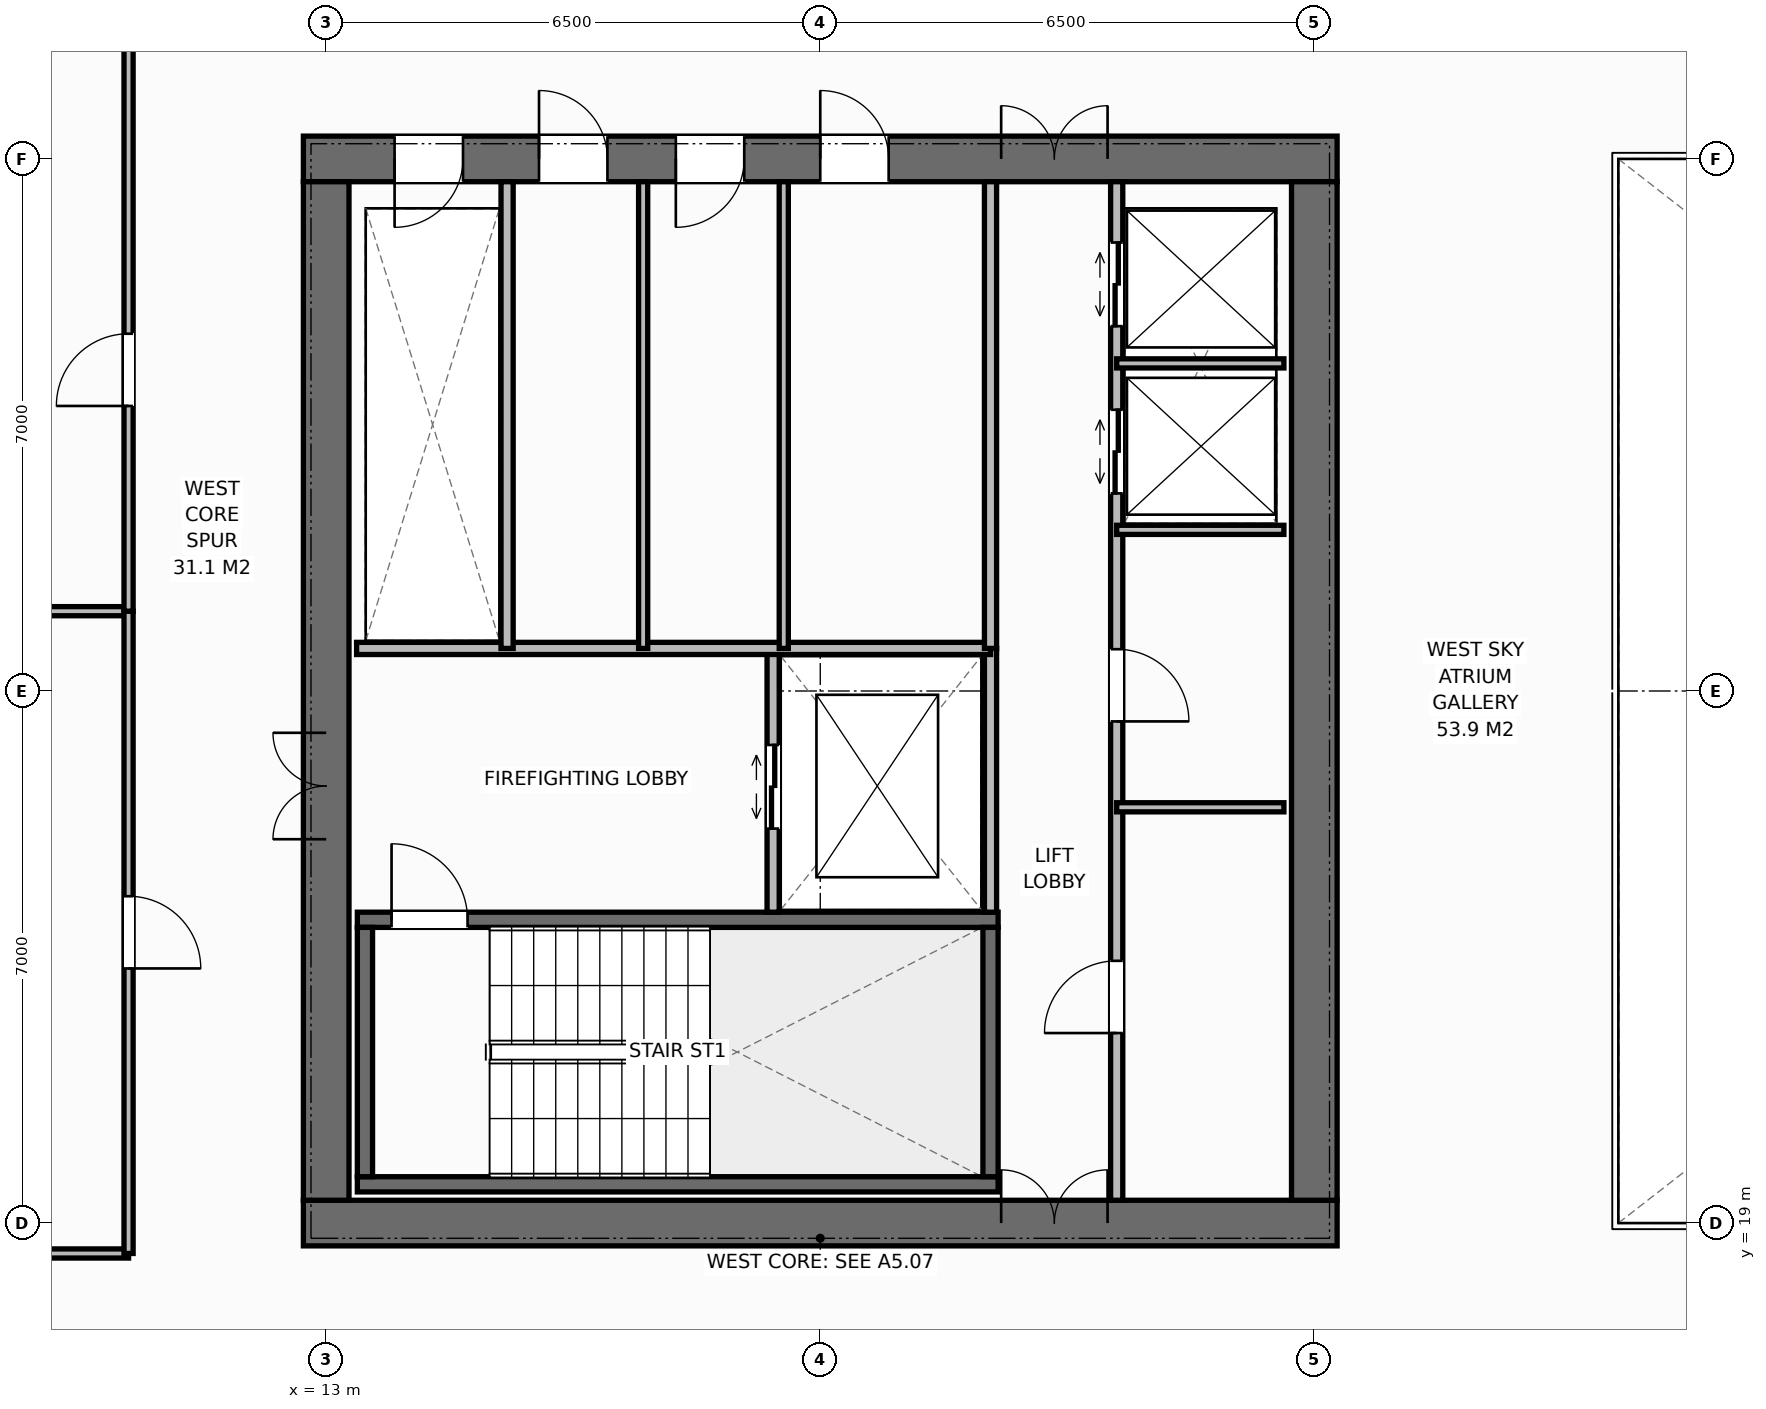
"""IFC4 building model, lengths in metres.
Left out: names, types, materials, properties, quantities, classifications, styles, units other than length and angle.
Written with IfcOpenShell. Run it as: python <this file> out.ifc"""

import sys

from ifc_helpers import new_model, si_unit, direction, frame, frame_2d, origin, place, context, subcontext, project, spatial, rectangle, extrude, element, fill, save


model = new_model("IFC4")
c1 = context("Model", 3, precision=1e-05, world=origin(), true_north=direction((0.0, 1.0)))
c2 = subcontext(c1, "Body", "Model", "MODEL_VIEW")
j1 = project(units=[si_unit("LENGTHUNIT", "METRE"), si_unit("PLANEANGLEUNIT", "RADIAN")], contexts=[c1])
p1 = place(None, origin())
s1 = spatial("IfcSite", under=j1, at=p1, CompositionType="ELEMENT")
p2 = place(p1, origin())
s2 = spatial("IfcBuilding", under=s1, at=p2, CompositionType="ELEMENT")
p3 = place(p2, frame((0.0, 0.0, 174.6)))
s3 = spatial("IfcBuildingStorey", under=s2, at=p3, CompositionType="ELEMENT", Elevation=174.6)
p4 = place(p3, frame((12.7, 19.0, 0.0), z_axis=(0.0, 0.0, 1.0), x_axis=(1.0, 0.0, 0.0)))
e1 = element("IfcWall", 1, at=p4, inside=s3, PredefinedType="SHEAR", context=c2, shape_type="SweptSolid", body=[
    extrude(rectangle(XDim=13.6, YDim=0.6, at=frame_2d((6.8, 0.0))), origin(), (0.0, 0.0, 1.0), 3.8),
])
p5 = place(p4, frame((9.18, 0.0, 0.0)))
e2 = element("IfcOpeningElement", 2, at=p5, cuts=e1, PredefinedType="OPENING", context=c2, shape_type="SweptSolid", body=[
    extrude(rectangle(XDim=1.4, YDim=2.2, at=frame_2d((0.7, 1.1))), frame((0.0, 0.31, 0.0), z_axis=(0.0, -1.0, 0.0), x_axis=(1.0, 0.0, 0.0)), (0.0, 0.0, 1.0), 0.62),
])
p6 = place(p3, frame((12.7, 33.0, 0.0), z_axis=(0.0, 0.0, 1.0), x_axis=(1.0, 0.0, 0.0)))
e3 = element("IfcWall", 3, at=p6, inside=s3, PredefinedType="SHEAR", context=c2, shape_type="SweptSolid", body=[
    extrude(rectangle(XDim=13.6, YDim=0.6, at=frame_2d((6.8, 0.0))), origin(), (0.0, 0.0, 1.0), 3.8),
])
p7 = place(p6, frame((1.2, 0.0, 0.0)))
e4 = element("IfcOpeningElement", 4, at=p7, cuts=e3, PredefinedType="OPENING", context=c2, shape_type="SweptSolid", body=[
    extrude(rectangle(XDim=0.9, YDim=2.15, at=frame_2d((0.45, 1.075))), frame((0.0, 0.31, 0.0), z_axis=(0.0, -1.0, 0.0), x_axis=(1.0, 0.0, 0.0)), (0.0, 0.0, 1.0), 0.62),
])
p8 = place(p6, frame((3.1, 0.0, 0.0)))
e5 = element("IfcOpeningElement", 5, at=p8, cuts=e3, PredefinedType="OPENING", context=c2, shape_type="SweptSolid", body=[
    extrude(rectangle(XDim=0.9, YDim=2.15, at=frame_2d((0.45, 1.075))), frame((0.0, 0.31, 0.0), z_axis=(0.0, -1.0, 0.0), x_axis=(1.0, 0.0, 0.0)), (0.0, 0.0, 1.0), 0.62),
])
p9 = place(p6, frame((4.9, 0.0, 0.0)))
e6 = element("IfcOpeningElement", 6, at=p9, cuts=e3, PredefinedType="OPENING", context=c2, shape_type="SweptSolid", body=[
    extrude(rectangle(XDim=0.9, YDim=2.15, at=frame_2d((0.45, 1.075))), frame((0.0, 0.31, 0.0), z_axis=(0.0, -1.0, 0.0), x_axis=(1.0, 0.0, 0.0)), (0.0, 0.0, 1.0), 0.62),
])
p10 = place(p6, frame((6.8, 0.0, 0.0)))
e7 = element("IfcOpeningElement", 7, at=p10, cuts=e3, PredefinedType="OPENING", context=c2, shape_type="SweptSolid", body=[
    extrude(rectangle(XDim=0.9, YDim=2.15, at=frame_2d((0.45, 1.075))), frame((0.0, 0.31, 0.0), z_axis=(0.0, -1.0, 0.0), x_axis=(1.0, 0.0, 0.0)), (0.0, 0.0, 1.0), 0.62),
])
p11 = place(p6, frame((9.18, 0.0, 0.0)))
e8 = element("IfcOpeningElement", 8, at=p11, cuts=e3, PredefinedType="OPENING", context=c2, shape_type="SweptSolid", body=[
    extrude(rectangle(XDim=1.4, YDim=2.2, at=frame_2d((0.7, 1.1))), frame((0.0, 0.31, 0.0), z_axis=(0.0, -1.0, 0.0), x_axis=(1.0, 0.0, 0.0)), (0.0, 0.0, 1.0), 0.62),
])
p12 = place(p3, frame((13.0, 19.3, 0.0), z_axis=(0.0, 0.0, 1.0), x_axis=(0.0, 1.0, 0.0)))
e9 = element("IfcWall", 9, at=p12, inside=s3, PredefinedType="SHEAR", context=c2, shape_type="SweptSolid", body=[
    extrude(rectangle(XDim=13.4, YDim=0.6, at=frame_2d((6.7, 0.0))), origin(), (0.0, 0.0, 1.0), 3.8),
])
p13 = place(p12, frame((4.75, 0.0, 0.0)))
e10 = element("IfcOpeningElement", 10, at=p13, cuts=e9, PredefinedType="OPENING", context=c2, shape_type="SweptSolid", body=[
    extrude(rectangle(XDim=1.4, YDim=2.2, at=frame_2d((0.7, 1.1))), frame((0.0, 0.31, 0.0), z_axis=(0.0, -1.0, 0.0), x_axis=(1.0, 0.0, 0.0)), (0.0, 0.0, 1.0), 0.62),
])
p14 = place(p3, frame((26.0, 19.3, 0.0), z_axis=(0.0, 0.0, 1.0), x_axis=(0.0, 1.0, 0.0)))
e11 = element("IfcWall", 11, at=p14, inside=s3, PredefinedType="SHEAR", context=c2, shape_type="SweptSolid", body=[
    extrude(rectangle(XDim=13.4, YDim=0.6, at=frame_2d((6.7, 0.0))), origin(), (0.0, 0.0, 1.0), 3.8),
])
p15 = place(p3, frame((13.41, 19.51, 0.0), z_axis=(0.0, 0.0, 1.0), x_axis=(1.0, 0.0, 0.0)))
e12 = element("IfcWall", 12, at=p15, inside=s3, PredefinedType="SHEAR", context=c2, shape_type="SweptSolid", body=[
    extrude(rectangle(XDim=8.43, YDim=0.2, at=frame_2d((4.215, 0.0))), origin(), (0.0, 0.0, 1.0), 3.8),
])
p16 = place(p3, frame((13.41, 22.99, 0.0), z_axis=(0.0, 0.0, 1.0), x_axis=(1.0, 0.0, 0.0)))
e13 = element("IfcWall", 13, at=p16, inside=s3, PredefinedType="SHEAR", context=c2, shape_type="SweptSolid", body=[
    extrude(rectangle(XDim=8.43, YDim=0.2, at=frame_2d((4.215, 0.0))), origin(), (0.0, 0.0, 1.0), 3.8),
])
p17 = place(p16, frame((0.45, 0.0, 0.0)))
e14 = element("IfcOpeningElement", 14, at=p17, cuts=e13, PredefinedType="OPENING", context=c2, shape_type="SweptSolid", body=[
    extrude(rectangle(XDim=1.0, YDim=2.15, at=frame_2d((0.5, 1.075))), frame((0.0, 0.11, 0.0), z_axis=(0.0, -1.0, 0.0), x_axis=(1.0, 0.0, 0.0)), (0.0, 0.0, 1.0), 0.22),
])
for number, where, z_axis, x_axis in (
    (15, (13.51, 19.61, 0.0), (0.0, 0.0, 1.0), (0.0, 1.0, 0.0)),
    (16, (21.74, 19.61, 0.0), (0.0, 0.0, 1.0), (0.0, 1.0, 0.0)),
):
    element("IfcWall", number, at=place(p3, frame(where, z_axis=z_axis, x_axis=x_axis)), inside=s3, PredefinedType="SHEAR", context=c2, shape_type="SweptSolid", body=[
        extrude(rectangle(XDim=3.28, YDim=0.2, at=frame_2d((1.64, 0.0))), origin(), (0.0, 0.0, 1.0), 3.8),
    ])
p18 = place(p3, frame((21.74, 23.09, 0.0), z_axis=(0.0, 0.0, 1.0), x_axis=(0.0, 1.0, 0.0)))
e17 = element("IfcWall", 17, at=p18, inside=s3, PredefinedType="STANDARD", context=c2, shape_type="SweptSolid", body=[
    extrude(rectangle(XDim=3.47, YDim=0.16, at=frame_2d((1.735, 0.0))), origin(), (0.0, 0.0, 1.0), 3.572),
])
p19 = place(p3, frame((18.88, 23.09, 0.0), z_axis=(0.0, 0.0, 1.0), x_axis=(0.0, 1.0, 0.0)))
e18 = element("IfcWall", 18, at=p19, inside=s3, PredefinedType="STANDARD", context=c2, shape_type="SweptSolid", body=[
    extrude(rectangle(XDim=3.47, YDim=0.16, at=frame_2d((1.735, 0.0))), origin(), (0.0, 0.0, 1.0), 3.572),
])
p20 = place(p19, frame((1.1, 0.0, 0.0)))
e19 = element("IfcOpeningElement", 19, at=p20, cuts=e18, PredefinedType="OPENING", context=c2, shape_type="SweptSolid", body=[
    extrude(rectangle(XDim=1.1, YDim=2.2, at=frame_2d((0.55, 1.1))), frame((0.0, 0.09, 0.0), z_axis=(0.0, -1.0, 0.0), x_axis=(1.0, 0.0, 0.0)), (0.0, 0.0, 1.0), 0.18),
])
p21 = place(p3, frame((13.4, 26.56, 0.0), z_axis=(0.0, 0.0, 1.0), x_axis=(1.0, 0.0, 0.0)))
e20 = element("IfcWall", 20, at=p21, inside=s3, PredefinedType="STANDARD", context=c2, shape_type="SweptSolid", body=[
    extrude(rectangle(XDim=8.34, YDim=0.16, at=frame_2d((4.17, 0.0))), origin(), (0.0, 0.0, 1.0), 3.572),
])
p22 = place(p3, frame((15.38, 26.56, 0.0), z_axis=(0.0, 0.0, 1.0), x_axis=(0.0, 1.0, 0.0)))
e21 = element("IfcWall", 21, at=p22, inside=s3, PredefinedType="STANDARD", context=c2, shape_type="SweptSolid", body=[
    extrude(rectangle(XDim=6.14, YDim=0.16, at=frame_2d((3.07, 0.0))), origin(), (0.0, 0.0, 1.0), 3.572),
])
for number, where, z_axis, x_axis in (
    (22, (17.17, 26.56, 0.0), (0.0, 0.0, 1.0), (0.0, 1.0, 0.0)),
    (23, (19.02, 26.56, 0.0), (0.0, 0.0, 1.0), (0.0, 1.0, 0.0)),
):
    element("IfcWall", number, at=place(p3, frame(where, z_axis=z_axis, x_axis=x_axis)), inside=s3, PredefinedType="PARTITIONING", context=c2, shape_type="SweptSolid", body=[
        extrude(rectangle(XDim=6.14, YDim=0.12, at=frame_2d((3.07, 0.0))), origin(), (0.0, 0.0, 1.0), 3.572),
    ])
p23 = place(p3, frame((21.74, 26.56, 0.0), z_axis=(0.0, 0.0, 1.0), x_axis=(0.0, 1.0, 0.0)))
e24 = element("IfcWall", 24, at=p23, inside=s3, PredefinedType="STANDARD", context=c2, shape_type="SweptSolid", body=[
    extrude(rectangle(XDim=6.14, YDim=0.16, at=frame_2d((3.07, 0.0))), origin(), (0.0, 0.0, 1.0), 3.572),
])
p24 = place(p3, frame((23.4, 19.3, 0.0), z_axis=(0.0, 0.0, 1.0), x_axis=(0.0, 1.0, 0.0)))
e25 = element("IfcWall", 25, at=p24, inside=s3, PredefinedType="STANDARD", context=c2, shape_type="SweptSolid", body=[
    extrude(rectangle(XDim=13.4, YDim=0.16, at=frame_2d((6.7, 0.0))), origin(), (0.0, 0.0, 1.0), 3.572),
])
p25 = place(p24, frame((2.2, 0.0, 0.0)))
e26 = element("IfcOpeningElement", 26, at=p25, cuts=e25, PredefinedType="OPENING", context=c2, shape_type="SweptSolid", body=[
    extrude(rectangle(XDim=0.95, YDim=2.15, at=frame_2d((0.475, 1.075))), frame((0.0, 0.09, 0.0), z_axis=(0.0, -1.0, 0.0), x_axis=(1.0, 0.0, 0.0)), (0.0, 0.0, 1.0), 0.18),
])
p26 = place(p24, frame((6.3, 0.0, 0.0)))
e27 = element("IfcOpeningElement", 27, at=p26, cuts=e25, PredefinedType="OPENING", context=c2, shape_type="SweptSolid", body=[
    extrude(rectangle(XDim=0.95, YDim=2.15, at=frame_2d((0.475, 1.075))), frame((0.0, 0.09, 0.0), z_axis=(0.0, -1.0, 0.0), x_axis=(1.0, 0.0, 0.0)), (0.0, 0.0, 1.0), 0.18),
])
p27 = place(p24, frame((9.3, 0.0, 0.0)))
e28 = element("IfcOpeningElement", 28, at=p27, cuts=e25, PredefinedType="OPENING", context=c2, shape_type="SweptSolid", body=[
    extrude(rectangle(XDim=1.1, YDim=2.2, at=frame_2d((0.55, 1.1))), frame((0.0, 0.09, 0.0), z_axis=(0.0, -1.0, 0.0), x_axis=(1.0, 0.0, 0.0)), (0.0, 0.0, 1.0), 0.18),
])
p28 = place(p24, frame((11.5, 0.0, 0.0)))
e29 = element("IfcOpeningElement", 29, at=p28, cuts=e25, PredefinedType="OPENING", context=c2, shape_type="SweptSolid", body=[
    extrude(rectangle(XDim=1.1, YDim=2.2, at=frame_2d((0.55, 1.1))), frame((0.0, 0.09, 0.0), z_axis=(0.0, -1.0, 0.0), x_axis=(1.0, 0.0, 0.0)), (0.0, 0.0, 1.0), 0.18),
])
for number, where, z_axis, x_axis in (
    (30, (23.4, 24.47, 0.0), (0.0, 0.0, 1.0), (1.0, 0.0, 0.0)),
    (31, (23.4, 28.12, 0.0), (0.0, 0.0, 1.0), (1.0, 0.0, 0.0)),
    (32, (23.4, 30.31, 0.0), (0.0, 0.0, 1.0), (1.0, 0.0, 0.0)),
):
    element("IfcWall", number, at=place(p3, frame(where, z_axis=z_axis, x_axis=x_axis)), inside=s3, PredefinedType="PARTITIONING", context=c2, shape_type="SweptSolid", body=[
        extrude(rectangle(XDim=2.2, YDim=0.12, at=frame_2d((1.1, 0.0))), origin(), (0.0, 0.0, 1.0), 3.572),
    ])
for number, where, z_axis, x_axis in (
    (33, (3.82, 18.6, 0.0), (0.0, 0.0, 1.0), (1.0, 0.0, 0.0)),
    (34, (3.82, 27.05, 0.0), (0.0, 0.0, 1.0), (1.0, 0.0, 0.0)),
):
    element("IfcWall", number, at=place(p3, frame(where, z_axis=z_axis, x_axis=x_axis)), inside=s3, PredefinedType="PARTITIONING", context=c2, shape_type="SweptSolid", body=[
        extrude(rectangle(XDim=6.58, YDim=0.12, at=frame_2d((3.29, 0.0))), origin(), (0.0, 0.0, 1.0), 3.572),
    ])
p29 = place(p3, frame((10.4, 18.6, 0.0), z_axis=(0.0, 0.0, 1.0), x_axis=(0.0, 1.0, 0.0)))
e35 = element("IfcWall", 35, at=p29, inside=s3, PredefinedType="PARTITIONING", context=c2, shape_type="SweptSolid", body=[
    extrude(rectangle(XDim=8.45, YDim=0.12, at=frame_2d((4.225, 0.0))), origin(), (0.0, 0.0, 1.0), 3.572),
])
p30 = place(p29, frame((3.75, 0.0, 0.0)))
e36 = element("IfcOpeningElement", 36, at=p30, cuts=e35, PredefinedType="OPENING", context=c2, shape_type="SweptSolid", body=[
    extrude(rectangle(XDim=0.95, YDim=2.15, at=frame_2d((0.475, 1.075))), frame((0.0, 0.07, 0.0), z_axis=(0.0, -1.0, 0.0), x_axis=(1.0, 0.0, 0.0)), (0.0, 0.0, 1.0), 0.14),
])
p31 = place(p3, frame((10.4, 27.05, 0.0), z_axis=(0.0, 0.0, 1.0), x_axis=(0.0, 1.0, 0.0)))
e37 = element("IfcWall", 37, at=p31, inside=s3, PredefinedType="PARTITIONING", context=c2, shape_type="SweptSolid", body=[
    extrude(rectangle(XDim=8.45, YDim=0.12, at=frame_2d((4.225, 0.0))), origin(), (0.0, 0.0, 1.0), 3.572),
])
p32 = place(p31, frame((2.7, 0.0, 0.0)))
e38 = element("IfcOpeningElement", 38, at=p32, cuts=e37, PredefinedType="OPENING", context=c2, shape_type="SweptSolid", body=[
    extrude(rectangle(XDim=0.95, YDim=2.15, at=frame_2d((0.475, 1.075))), frame((0.0, 0.07, 0.0), z_axis=(0.0, -1.0, 0.0), x_axis=(1.0, 0.0, 0.0)), (0.0, 0.0, 1.0), 0.14),
])
p33 = place(p17, origin())
e39 = element("IfcDoor", 39, at=p33, inside=s3, OperationType="SINGLE_SWING_LEFT", PredefinedType="DOOR", context=c2, shape_type="SweptSolid", body=[
    extrude(rectangle(XDim=1.0, YDim=2.15, at=frame_2d((0.5, 1.075))), frame((0.0, 0.025, 0.0), z_axis=(0.0, -1.0, 0.0), x_axis=(1.0, 0.0, 0.0)), (0.0, 0.0, 1.0), 0.05),
])
fill(e14, e39)
p34 = place(p13, origin())
e40 = element("IfcDoor", 40, at=p34, inside=s3, OperationType="DOUBLE_DOOR_SINGLE_SWING", PredefinedType="DOOR", context=c2, shape_type="SweptSolid", body=[
    extrude(rectangle(XDim=1.4, YDim=2.2, at=frame_2d((0.7, 1.1))), frame((0.0, 0.025, 0.0), z_axis=(0.0, -1.0, 0.0), x_axis=(1.0, 0.0, 0.0)), (0.0, 0.0, 1.0), 0.05),
])
fill(e10, e40)
p35 = place(p20, origin())
e41 = element("IfcDoor", 41, at=p35, inside=s3, OperationType="DOUBLE_DOOR_SLIDING", PredefinedType="DOOR", context=c2, shape_type="SweptSolid", body=[
    extrude(rectangle(XDim=1.1, YDim=2.2, at=frame_2d((0.55, 1.1))), frame((0.0, 0.025, 0.0), z_axis=(0.0, -1.0, 0.0), x_axis=(1.0, 0.0, 0.0)), (0.0, 0.0, 1.0), 0.05),
])
fill(e19, e41)
p36 = place(p7, origin())
e42 = element("IfcDoor", 42, at=p36, inside=s3, OperationType="SINGLE_SWING_RIGHT", PredefinedType="DOOR", context=c2, shape_type="SweptSolid", body=[
    extrude(rectangle(XDim=0.9, YDim=2.15, at=frame_2d((0.45, 1.075))), frame((0.0, -0.025, 0.0), z_axis=(0.0, -1.0, 0.0), x_axis=(1.0, 0.0, 0.0)), (0.0, 0.0, 1.0), 0.05),
])
fill(e4, e42)
p37 = place(p8, origin())
e43 = element("IfcDoor", 43, at=p37, inside=s3, OperationType="SINGLE_SWING_LEFT", PredefinedType="DOOR", context=c2, shape_type="SweptSolid", body=[
    extrude(rectangle(XDim=0.9, YDim=2.15, at=frame_2d((0.45, 1.075))), frame((0.0, -0.025, 0.0), z_axis=(0.0, -1.0, 0.0), x_axis=(1.0, 0.0, 0.0)), (0.0, 0.0, 1.0), 0.05),
])
fill(e5, e43)
p38 = place(p9, origin())
e44 = element("IfcDoor", 44, at=p38, inside=s3, OperationType="SINGLE_SWING_RIGHT", PredefinedType="DOOR", context=c2, shape_type="SweptSolid", body=[
    extrude(rectangle(XDim=0.9, YDim=2.15, at=frame_2d((0.45, 1.075))), frame((0.0, -0.025, 0.0), z_axis=(0.0, -1.0, 0.0), x_axis=(1.0, 0.0, 0.0)), (0.0, 0.0, 1.0), 0.05),
])
fill(e6, e44)
p39 = place(p10, origin())
e45 = element("IfcDoor", 45, at=p39, inside=s3, OperationType="SINGLE_SWING_LEFT", PredefinedType="DOOR", context=c2, shape_type="SweptSolid", body=[
    extrude(rectangle(XDim=0.9, YDim=2.15, at=frame_2d((0.45, 1.075))), frame((0.0, -0.025, 0.0), z_axis=(0.0, -1.0, 0.0), x_axis=(1.0, 0.0, 0.0)), (0.0, 0.0, 1.0), 0.05),
])
fill(e7, e45)
p40 = place(p5, origin())
e46 = element("IfcDoor", 46, at=p40, inside=s3, OperationType="DOUBLE_DOOR_SINGLE_SWING", PredefinedType="DOOR", context=c2, shape_type="SweptSolid", body=[
    extrude(rectangle(XDim=1.4, YDim=2.2, at=frame_2d((0.7, 1.1))), frame((0.0, 0.075, 0.0), z_axis=(0.0, -1.0, 0.0), x_axis=(1.0, 0.0, 0.0)), (0.0, 0.0, 1.0), 0.05),
])
fill(e2, e46)
p41 = place(p11, origin())
e47 = element("IfcDoor", 47, at=p41, inside=s3, OperationType="DOUBLE_DOOR_SINGLE_SWING", PredefinedType="DOOR", context=c2, shape_type="SweptSolid", body=[
    extrude(rectangle(XDim=1.4, YDim=2.2, at=frame_2d((0.7, 1.1))), frame((0.0, -0.025, 0.0), z_axis=(0.0, -1.0, 0.0), x_axis=(1.0, 0.0, 0.0)), (0.0, 0.0, 1.0), 0.05),
])
fill(e8, e47)
p42 = place(p25, origin())
e48 = element("IfcDoor", 48, at=p42, inside=s3, OperationType="SINGLE_SWING_LEFT", PredefinedType="DOOR", context=c2, shape_type="SweptSolid", body=[
    extrude(rectangle(XDim=0.95, YDim=2.15, at=frame_2d((0.475, 1.075))), frame((0.0, 0.025, 0.0), z_axis=(0.0, -1.0, 0.0), x_axis=(1.0, 0.0, 0.0)), (0.0, 0.0, 1.0), 0.05),
])
fill(e26, e48)
p43 = place(p26, origin())
e49 = element("IfcDoor", 49, at=p43, inside=s3, OperationType="SINGLE_SWING_RIGHT", PredefinedType="DOOR", context=c2, shape_type="SweptSolid", body=[
    extrude(rectangle(XDim=0.95, YDim=2.15, at=frame_2d((0.475, 1.075))), frame((0.0, 0.025, 0.0), z_axis=(0.0, -1.0, 0.0), x_axis=(1.0, 0.0, 0.0)), (0.0, 0.0, 1.0), 0.05),
])
fill(e27, e49)
p44 = place(p27, origin())
e50 = element("IfcDoor", 50, at=p44, inside=s3, OperationType="DOUBLE_DOOR_SLIDING", PredefinedType="DOOR", context=c2, shape_type="SweptSolid", body=[
    extrude(rectangle(XDim=1.1, YDim=2.2, at=frame_2d((0.55, 1.1))), frame((0.0, 0.025, 0.0), z_axis=(0.0, -1.0, 0.0), x_axis=(1.0, 0.0, 0.0)), (0.0, 0.0, 1.0), 0.05),
])
fill(e28, e50)
p45 = place(p28, origin())
e51 = element("IfcDoor", 51, at=p45, inside=s3, OperationType="DOUBLE_DOOR_SLIDING", PredefinedType="DOOR", context=c2, shape_type="SweptSolid", body=[
    extrude(rectangle(XDim=1.1, YDim=2.2, at=frame_2d((0.55, 1.1))), frame((0.0, 0.025, 0.0), z_axis=(0.0, -1.0, 0.0), x_axis=(1.0, 0.0, 0.0)), (0.0, 0.0, 1.0), 0.05),
])
fill(e29, e51)
p46 = place(p30, origin())
e52 = element("IfcDoor", 52, at=p46, inside=s3, OperationType="SINGLE_SWING_RIGHT", PredefinedType="DOOR", context=c2, shape_type="SweptSolid", body=[
    extrude(rectangle(XDim=0.95, YDim=2.15, at=frame_2d((0.475, 1.075))), frame((0.0, 0.025, 0.0), z_axis=(0.0, -1.0, 0.0), x_axis=(1.0, 0.0, 0.0)), (0.0, 0.0, 1.0), 0.05),
])
fill(e36, e52)
p47 = place(p32, origin())
e53 = element("IfcDoor", 53, at=p47, inside=s3, OperationType="SINGLE_SWING_LEFT", PredefinedType="DOOR", context=c2, shape_type="SweptSolid", body=[
    extrude(rectangle(XDim=0.95, YDim=2.15, at=frame_2d((0.475, 1.075))), frame((0.0, 0.025, 0.0), z_axis=(0.0, -1.0, 0.0), x_axis=(1.0, 0.0, 0.0)), (0.0, 0.0, 1.0), 0.05),
])
fill(e38, e53)
save(model, sys.argv[1])
